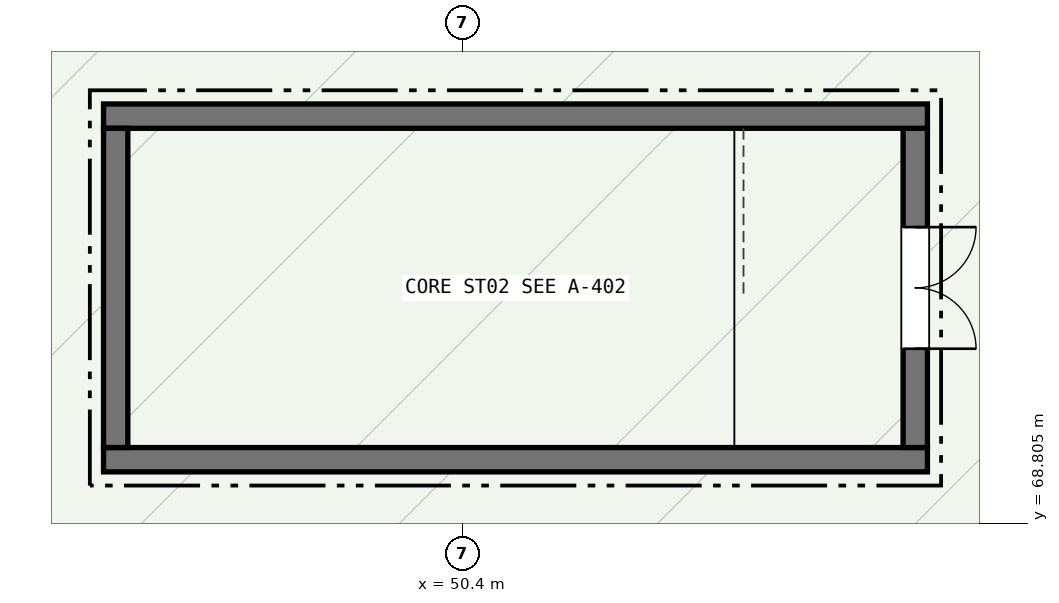
"""IFC4 building model, lengths in metres.
Left out: names, types, materials, properties, quantities, classifications, styles, units other than length and angle.
Written with IfcOpenShell. Run it as: python <this file> out.ifc"""

import sys

from ifc_helpers import new_model, si_unit, direction, frame, frame_2d, origin, place, context, subcontext, project, spatial, rectangle, extrude, element, fill, save


model = new_model("IFC4")
c1 = context("Model", 3, precision=1e-05, world=origin(), true_north=direction((0.0, 1.0)))
c2 = subcontext(c1, "Body", "Model", "MODEL_VIEW")
j1 = project(units=[si_unit("LENGTHUNIT", "METRE"), si_unit("PLANEANGLEUNIT", "RADIAN")], contexts=[c1])
p1 = place(None, origin())
s1 = spatial("IfcSite", under=j1, at=p1, CompositionType="ELEMENT")
p2 = place(p1, origin())
s2 = spatial("IfcBuilding", under=s1, at=p2, CompositionType="ELEMENT")
p3 = place(p2, frame((0.0, 0.0, 31.8)))
s3 = spatial("IfcBuildingStorey", under=s2, at=p3, CompositionType="ELEMENT", Elevation=31.8)
p4 = place(p3, frame((45.68, 69.64, 0.0), z_axis=(0.0, 0.0, 1.0), x_axis=(1.0, 0.0, 0.0)))
e1 = element("IfcWall", 1, at=p4, inside=s3, PredefinedType="SHEAR", context=c2, shape_type="SweptSolid", body=[
    extrude(rectangle(XDim=10.84, YDim=0.32, at=frame_2d((5.42, 0.0))), origin(), (0.0, 0.0, 1.0), 3.2),
])
p5 = place(p3, frame((56.36, 69.8, 0.0), z_axis=(0.0, 0.0, 1.0), x_axis=(0.0, 1.0, 0.0)))
e2 = element("IfcWall", 2, at=p5, inside=s3, PredefinedType="SHEAR", context=c2, shape_type="SweptSolid", body=[
    extrude(rectangle(XDim=4.2, YDim=0.32, at=frame_2d((2.1, 0.0))), origin(), (0.0, 0.0, 1.0), 3.2),
])
p6 = place(p5, frame((1.3, 0.0, 0.0)))
e3 = element("IfcOpeningElement", 3, at=p6, cuts=e2, PredefinedType="OPENING", context=c2, shape_type="SweptSolid", body=[
    extrude(rectangle(XDim=1.6, YDim=2.2, at=frame_2d((0.8, 1.1))), frame((0.0, 0.17, 0.0), z_axis=(0.0, -1.0, 0.0), x_axis=(1.0, 0.0, 0.0)), (0.0, 0.0, 1.0), 0.34),
])
p7 = place(p3, frame((56.52, 74.16, 0.0), z_axis=(0.0, 0.0, 1.0), x_axis=(-1.0, 0.0, 0.0)))
e4 = element("IfcWall", 4, at=p7, inside=s3, PredefinedType="SHEAR", context=c2, shape_type="SweptSolid", body=[
    extrude(rectangle(XDim=10.84, YDim=0.32, at=frame_2d((5.42, 0.0))), origin(), (0.0, 0.0, 1.0), 3.2),
])
p8 = place(p3, frame((45.84, 74.0, 0.0), z_axis=(0.0, 0.0, 1.0), x_axis=(0.0, -1.0, 0.0)))
e5 = element("IfcWall", 5, at=p8, inside=s3, PredefinedType="SHEAR", context=c2, shape_type="SweptSolid", body=[
    extrude(rectangle(XDim=4.2, YDim=0.32, at=frame_2d((2.1, 0.0))), origin(), (0.0, 0.0, 1.0), 3.2),
])
p9 = place(p6, frame((1.6, 0.0, 0.0), z_axis=(0.0, 0.0, 1.0), x_axis=(-1.0, 0.0, 0.0)))
e6 = element("IfcDoor", 6, at=p9, inside=s3, OperationType="DOUBLE_DOOR_SINGLE_SWING", PredefinedType="DOOR", context=c2, shape_type="SweptSolid", body=[
    extrude(rectangle(XDim=1.6, YDim=2.2, at=frame_2d((0.8, 1.1))), frame((0.0, 0.025, 0.0), z_axis=(0.0, -1.0, 0.0), x_axis=(1.0, 0.0, 0.0)), (0.0, 0.0, 1.0), 0.05),
])
fill(e3, e6)
save(model, sys.argv[1])
